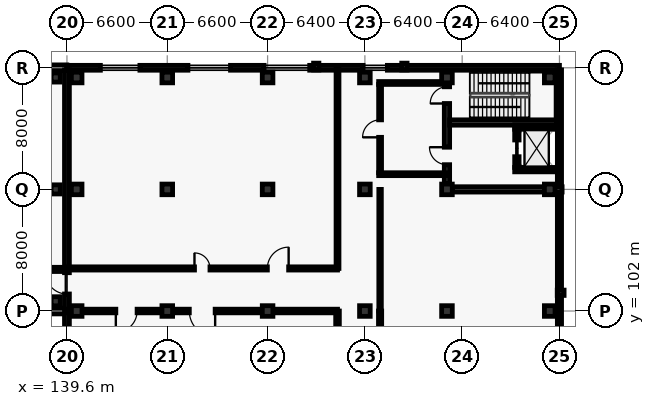
"""IFC4 building model, lengths in metres.
Left out: names, types, materials, properties, quantities, classifications, styles, units other than length and angle.
Written with IfcOpenShell. Run it as: python <this file> out.ifc"""

import sys

from ifc_helpers import new_model, si_unit, direction, frame, frame_2d, origin, origin_2d, place, context, subcontext, project, spatial, rectangle, extrude, element, fill, save


model = new_model("IFC4")
c1 = context("Model", 3, precision=1e-05, world=origin(), true_north=direction((0.0, 1.0)))
c2 = subcontext(c1, "Body", "Model", "MODEL_VIEW")
j1 = project(units=[si_unit("LENGTHUNIT", "METRE"), si_unit("PLANEANGLEUNIT", "RADIAN")], contexts=[c1])
p1 = place(None, origin())
s1 = spatial("IfcSite", under=j1, at=p1, CompositionType="ELEMENT")
p2 = place(p1, origin())
s2 = spatial("IfcBuilding", under=s1, at=p2, CompositionType="ELEMENT")
p3 = place(p2, frame((0.0, 0.0, 15.6)))
s3 = spatial("IfcBuildingStorey", under=s2, at=p3, CompositionType="ELEMENT", Elevation=15.6)
for number, where, z_axis, x_axis in (
    (1, (138.86, 102.64, 0.0), (0.0, 0.0, 1.0), (1.0, 0.0, 0.0)),
    (2, (138.86, 110.0, 0.0), (0.0, 0.0, 1.0), (1.0, 0.0, 0.0)),
    (3, (138.86, 117.36, 0.0), (0.0, 0.0, 1.0), (1.0, 0.0, 0.0)),
):
    element("IfcColumn", number, at=place(p3, frame(where, z_axis=z_axis, x_axis=x_axis)), inside=s3, PredefinedType="COLUMN", context=c2, shape_type="SweptSolid", body=[
        extrude(rectangle(XDim=0.6, YDim=0.6, at=origin_2d()), origin(), (0.0, 0.0, 1.0), 4.8),
    ])
for number, where, z_axis, x_axis in (
    (4, (140.24, 102.0, 0.0), (0.0, 0.0, 1.0), (1.0, 0.0, 0.0)),
    (5, (140.24, 110.0, 0.0), (0.0, 0.0, 1.0), (1.0, 0.0, 0.0)),
    (6, (140.24, 117.36, 0.0), (0.0, 0.0, 1.0), (1.0, 0.0, 0.0)),
    (7, (146.2, 102.0, 0.0), (0.0, 0.0, 1.0), (1.0, 0.0, 0.0)),
    (8, (146.2, 110.0, 0.0), (0.0, 0.0, 1.0), (1.0, 0.0, 0.0)),
    (9, (146.2, 117.36, 0.0), (0.0, 0.0, 1.0), (1.0, 0.0, 0.0)),
    (10, (152.8, 102.0, 0.0), (0.0, 0.0, 1.0), (1.0, 0.0, 0.0)),
    (11, (152.8, 110.0, 0.0), (0.0, 0.0, 1.0), (1.0, 0.0, 0.0)),
    (12, (152.8, 117.36, 0.0), (0.0, 0.0, 1.0), (1.0, 0.0, 0.0)),
    (13, (159.2, 102.0, 0.0), (0.0, 0.0, 1.0), (1.0, 0.0, 0.0)),
    (14, (159.2, 110.0, 0.0), (0.0, 0.0, 1.0), (1.0, 0.0, 0.0)),
    (15, (159.2, 117.36, 0.0), (0.0, 0.0, 1.0), (1.0, 0.0, 0.0)),
    (16, (164.6, 102.0, 0.0), (0.0, 0.0, 1.0), (1.0, 0.0, 0.0)),
    (17, (164.6, 110.0, 0.0), (0.0, 0.0, 1.0), (1.0, 0.0, 0.0)),
    (18, (164.6, 117.36, 0.0), (0.0, 0.0, 1.0), (1.0, 0.0, 0.0)),
    (19, (171.36, 102.0, 0.0), (0.0, 0.0, 1.0), (1.0, 0.0, 0.0)),
    (20, (171.36, 110.0, 0.0), (0.0, 0.0, 1.0), (1.0, 0.0, 0.0)),
    (21, (171.36, 117.36, 0.0), (0.0, 0.0, 1.0), (1.0, 0.0, 0.0)),
):
    element("IfcColumn", number, at=place(p3, frame(where, z_axis=z_axis, x_axis=x_axis)), inside=s3, PredefinedType="COLUMN", context=c2, shape_type="SweptSolid", body=[
        extrude(rectangle(XDim=0.7, YDim=0.7, at=origin_2d()), origin(), (0.0, 0.0, 1.0), 4.8),
    ])
for number, where, z_axis, x_axis in (
    (22, (172.08, 103.2, 0.0), (0.0, 0.0, 1.0), (1.0, 0.0, 0.0)),
    (23, (156.0, 118.08, 0.0), (0.0, 0.0, 1.0), (0.0, 1.0, 0.0)),
    (24, (161.8, 118.08, 0.0), (0.0, 0.0, 1.0), (0.0, 1.0, 0.0)),
):
    element("IfcColumn", number, at=place(p3, frame(where, z_axis=z_axis, x_axis=x_axis)), inside=s3, PredefinedType="PILASTER", context=c2, shape_type="SweptSolid", body=[
        extrude(rectangle(XDim=0.35, YDim=0.45, at=origin_2d()), origin(), (0.0, 0.0, 1.0), 4.8),
    ])
p4 = place(p3, frame((110.8, 118.0, 0.0), z_axis=(0.0, 0.0, 1.0), x_axis=(1.0, 0.0, 0.0)))
e25 = element("IfcWall", 25, at=p4, inside=s3, PredefinedType="SOLIDWALL", context=c2, shape_type="SweptSolid", body=[
    extrude(rectangle(XDim=28.795, YDim=0.38, at=frame_2d((14.397, 0.0))), origin(), (0.0, 0.0, 1.0), 4.555),
])
p5 = place(p4, frame((0.75, 0.0, 0.9)))
e26 = element("IfcOpeningElement", 26, at=p5, cuts=e25, PredefinedType="OPENING", context=c2, shape_type="SweptSolid", body=[
    extrude(rectangle(XDim=2.4, YDim=1.75, at=frame_2d((1.2, 0.875))), frame((0.0, 0.2, 0.0), z_axis=(0.0, -1.0, 0.0), x_axis=(1.0, 0.0, 0.0)), (0.0, 0.0, 1.0), 0.4),
])
p6 = place(p4, frame((8.475, 0.0, 0.9)))
e27 = element("IfcOpeningElement", 27, at=p6, cuts=e25, PredefinedType="OPENING", context=c2, shape_type="SweptSolid", body=[
    extrude(rectangle(XDim=2.6, YDim=1.75, at=frame_2d((1.3, 0.875))), frame((0.0, 0.2, 0.0), z_axis=(0.0, -1.0, 0.0), x_axis=(1.0, 0.0, 0.0)), (0.0, 0.0, 1.0), 0.4),
])
p7 = place(p4, frame((14.75, 0.0, 0.9)))
e28 = element("IfcOpeningElement", 28, at=p7, cuts=e25, PredefinedType="OPENING", context=c2, shape_type="SweptSolid", body=[
    extrude(rectangle(XDim=2.8, YDim=1.8, at=frame_2d((1.4, 0.9))), frame((0.0, 0.2, 0.0), z_axis=(0.0, -1.0, 0.0), x_axis=(1.0, 0.0, 0.0)), (0.0, 0.0, 1.0), 0.4),
])
p8 = place(p4, frame((21.025, 0.0, 0.9)))
e29 = element("IfcOpeningElement", 29, at=p8, cuts=e25, PredefinedType="OPENING", context=c2, shape_type="SweptSolid", body=[
    extrude(rectangle(XDim=3.0, YDim=1.8, at=frame_2d((1.5, 0.9))), frame((0.0, 0.2, 0.0), z_axis=(0.0, -1.0, 0.0), x_axis=(1.0, 0.0, 0.0)), (0.0, 0.0, 1.0), 0.4),
])
p9 = place(p3, frame((139.5, 102.0, 0.0), z_axis=(0.0, 0.0, 1.0), x_axis=(-1.0, 0.0, 0.0)))
e30 = element("IfcWall", 30, at=p9, inside=s3, PredefinedType="SOLIDWALL", context=c2, shape_type="SweptSolid", body=[
    extrude(rectangle(XDim=28.7, YDim=0.38, at=frame_2d((14.35, 0.0))), origin(), (0.0, 0.0, 1.0), 4.555),
])
p10 = place(p9, frame((2.2, 0.0, 0.9)))
e31 = element("IfcOpeningElement", 31, at=p10, cuts=e30, PredefinedType="OPENING", context=c2, shape_type="SweptSolid", body=[
    extrude(rectangle(XDim=3.2, YDim=1.85, at=frame_2d((1.6, 0.925))), frame((0.0, 0.2, 0.0), z_axis=(0.0, -1.0, 0.0), x_axis=(1.0, 0.0, 0.0)), (0.0, 0.0, 1.0), 0.4),
])
p11 = place(p9, frame((8.475, 0.0, 0.9)))
e32 = element("IfcOpeningElement", 32, at=p11, cuts=e30, PredefinedType="OPENING", context=c2, shape_type="SweptSolid", body=[
    extrude(rectangle(XDim=3.4, YDim=1.85, at=frame_2d((1.7, 0.925))), frame((0.0, 0.2, 0.0), z_axis=(0.0, -1.0, 0.0), x_axis=(1.0, 0.0, 0.0)), (0.0, 0.0, 1.0), 0.4),
])
p12 = place(p9, frame((14.75, 0.0, 0.9)))
e33 = element("IfcOpeningElement", 33, at=p12, cuts=e30, PredefinedType="OPENING", context=c2, shape_type="SweptSolid", body=[
    extrude(rectangle(XDim=3.6, YDim=1.9, at=frame_2d((1.8, 0.95))), frame((0.0, 0.2, 0.0), z_axis=(0.0, -1.0, 0.0), x_axis=(1.0, 0.0, 0.0)), (0.0, 0.0, 1.0), 0.4),
])
p13 = place(p9, frame((21.025, 0.0, 0.9)))
e34 = element("IfcOpeningElement", 34, at=p13, cuts=e30, PredefinedType="OPENING", context=c2, shape_type="SweptSolid", body=[
    extrude(rectangle(XDim=3.8, YDim=1.9, at=frame_2d((1.9, 0.95))), frame((0.0, 0.2, 0.0), z_axis=(0.0, -1.0, 0.0), x_axis=(1.0, 0.0, 0.0)), (0.0, 0.0, 1.0), 0.4),
])
p14 = place(p3, frame((139.6, 118.0, 0.0), z_axis=(0.0, 0.0, 1.0), x_axis=(1.0, 0.0, 0.0)))
e35 = element("IfcWall", 35, at=p14, inside=s3, PredefinedType="SOLIDWALL", context=c2, shape_type="SweptSolid", body=[
    extrude(rectangle(XDim=32.4, YDim=0.32, at=frame_2d((16.2, 0.0))), origin(), (0.0, 0.0, 1.0), 4.58),
])
p15 = place(p14, frame((2.2, 0.0, 0.9)))
e36 = element("IfcOpeningElement", 36, at=p15, cuts=e35, PredefinedType="OPENING", context=c2, shape_type="SweptSolid", body=[
    extrude(rectangle(XDim=2.6, YDim=1.75, at=frame_2d((1.3, 0.875))), frame((0.0, 0.17, 0.0), z_axis=(0.0, -1.0, 0.0), x_axis=(1.0, 0.0, 0.0)), (0.0, 0.0, 1.0), 0.34),
])
p16 = place(p14, frame((7.96, 0.0, 0.9)))
e37 = element("IfcOpeningElement", 37, at=p16, cuts=e35, PredefinedType="OPENING", context=c2, shape_type="SweptSolid", body=[
    extrude(rectangle(XDim=2.8, YDim=1.8, at=frame_2d((1.4, 0.9))), frame((0.0, 0.17, 0.0), z_axis=(0.0, -1.0, 0.0), x_axis=(1.0, 0.0, 0.0)), (0.0, 0.0, 1.0), 0.34),
])
p17 = place(p14, frame((12.97, 0.0, 0.9)))
e38 = element("IfcOpeningElement", 38, at=p17, cuts=e35, PredefinedType="OPENING", context=c2, shape_type="SweptSolid", body=[
    extrude(rectangle(XDim=3.0, YDim=1.8, at=frame_2d((1.5, 0.9))), frame((0.0, 0.17, 0.0), z_axis=(0.0, -1.0, 0.0), x_axis=(1.0, 0.0, 0.0)), (0.0, 0.0, 1.0), 0.34),
])
p18 = place(p14, frame((19.48, 0.0, 0.9)))
e39 = element("IfcOpeningElement", 39, at=p18, cuts=e35, PredefinedType="OPENING", context=c2, shape_type="SweptSolid", body=[
    extrude(rectangle(XDim=1.6, YDim=1.65, at=frame_2d((0.8, 0.825))), frame((0.0, 0.17, 0.0), z_axis=(0.0, -1.0, 0.0), x_axis=(1.0, 0.0, 0.0)), (0.0, 0.0, 1.0), 0.34),
])
p19 = place(p3, frame((172.0, 117.86, 0.0), z_axis=(0.0, 0.0, 1.0), x_axis=(0.0, -1.0, 0.0)))
e40 = element("IfcWall", 40, at=p19, inside=s3, PredefinedType="SOLIDWALL", context=c2, shape_type="SweptSolid", body=[
    extrude(rectangle(XDim=46.12, YDim=0.275, at=frame_2d((23.06, 0.0))), origin(), (0.0, 0.0, 1.0), 4.58),
])
p20 = place(p3, frame((139.6, 71.74, 0.0), z_axis=(0.0, 0.0, 1.0), x_axis=(0.0, 1.0, 0.0)))
e41 = element("IfcWall", 41, at=p20, inside=s3, PredefinedType="SOLIDWALL", context=c2, shape_type="SweptSolid", body=[
    extrude(rectangle(XDim=46.12, YDim=0.32, at=frame_2d((23.06, 0.0))), origin(), (0.0, 0.0, 1.0), 4.58),
])
p21 = place(p20, frame((31.38, 0.0, 0.0)))
e42 = element("IfcOpeningElement", 42, at=p21, cuts=e41, PredefinedType="OPENING", context=c2, shape_type="SweptSolid", body=[
    extrude(rectangle(XDim=1.4, YDim=2.25, at=frame_2d((0.7, 1.125))), frame((0.0, 0.17, 0.0), z_axis=(0.0, -1.0, 0.0), x_axis=(1.0, 0.0, 0.0)), (0.0, 0.0, 1.0), 0.34),
])
p22 = place(p3, frame((164.952, 110.0, 0.0), z_axis=(0.0, 0.0, 1.0), x_axis=(1.0, 0.0, 0.0)))
e43 = element("IfcWall", 43, at=p22, inside=s3, PredefinedType="SHEAR", context=c2, shape_type="SweptSolid", body=[
    extrude(rectangle(XDim=7.223, YDim=0.35, at=frame_2d((3.612, 0.0))), origin(), (0.0, 0.0, 1.0), 4.58),
])
p23 = place(p3, frame((164.6, 110.352, 0.0), z_axis=(0.0, 0.0, 1.0), x_axis=(0.0, 1.0, 0.0)))
e44 = element("IfcWall", 44, at=p23, inside=s3, PredefinedType="SHEAR", context=c2, shape_type="SweptSolid", body=[
    extrude(rectangle(XDim=7.473, YDim=0.35, at=frame_2d((3.736, 0.0))), origin(), (0.0, 0.0, 1.0), 4.58),
])
p24 = place(p23, frame((5.298, 0.0, 0.0)))
e45 = element("IfcOpeningElement", 45, at=p24, cuts=e44, PredefinedType="OPENING", context=c2, shape_type="SweptSolid", body=[
    extrude(rectangle(XDim=1.1, YDim=2.15, at=frame_2d((0.55, 1.075))), frame((0.0, 0.185, 0.0), z_axis=(0.0, -1.0, 0.0), x_axis=(1.0, 0.0, 0.0)), (0.0, 0.0, 1.0), 0.37),
])
p25 = place(p23, frame((1.273, 0.0, 0.0)))
e46 = element("IfcOpeningElement", 46, at=p25, cuts=e44, PredefinedType="OPENING", context=c2, shape_type="SweptSolid", body=[
    extrude(rectangle(XDim=1.15, YDim=2.2, at=frame_2d((0.575, 1.1))), frame((0.0, 0.185, 0.0), z_axis=(0.0, -1.0, 0.0), x_axis=(1.0, 0.0, 0.0)), (0.0, 0.0, 1.0), 0.37),
])
p26 = place(p3, frame((164.775, 114.4, 0.0), z_axis=(0.0, 0.0, 1.0), x_axis=(1.0, 0.0, 0.0)))
e47 = element("IfcWall", 47, at=p26, inside=s3, PredefinedType="SHEAR", context=c2, shape_type="SweptSolid", body=[
    extrude(rectangle(XDim=7.05, YDim=0.35, at=frame_2d((3.525, 0.0))), origin(), (0.0, 0.0, 1.0), 4.58),
])
for number, where, z_axis, x_axis in (
    (48, (169.055, 111.3, 0.0), (0.0, 0.0, 1.0), (1.0, 0.0, 0.0)),
    (49, (169.055, 114.1, 0.0), (0.0, 0.0, 1.0), (1.0, 0.0, 0.0)),
):
    element("IfcWall", number, at=place(p3, frame(where, z_axis=z_axis, x_axis=x_axis)), inside=s3, PredefinedType="SHEAR", context=c2, shape_type="SweptSolid", body=[
        extrude(rectangle(XDim=2.89, YDim=0.29, at=frame_2d((1.445, 0.0))), origin(), (0.0, 0.0, 1.0), 4.58),
    ])
p27 = place(p3, frame((169.2, 111.445, 0.0), z_axis=(0.0, 0.0, 1.0), x_axis=(0.0, 1.0, 0.0)))
e50 = element("IfcWall", 50, at=p27, inside=s3, PredefinedType="SHEAR", context=c2, shape_type="SweptSolid", body=[
    extrude(rectangle(XDim=2.51, YDim=0.29, at=frame_2d((1.255, 0.0))), origin(), (0.0, 0.0, 1.0), 4.58),
])
p28 = place(p27, frame((0.705, 0.0, 0.0)))
e51 = element("IfcOpeningElement", 51, at=p28, cuts=e50, PredefinedType="OPENING", context=c2, shape_type="SweptSolid", body=[
    extrude(rectangle(XDim=1.1, YDim=2.15, at=frame_2d((0.55, 1.075))), frame((0.0, 0.155, 0.0), z_axis=(0.0, -1.0, 0.0), x_axis=(1.0, 0.0, 0.0)), (0.0, 0.0, 1.0), 0.31),
])
p29 = place(p3, frame((160.105, 111.0, 0.0), z_axis=(0.0, 0.0, 1.0), x_axis=(1.0, 0.0, 0.0)))
e52 = element("IfcWall", 52, at=p29, inside=s3, PredefinedType="PARTITIONING", context=c2, shape_type="SweptSolid", body=[
    extrude(rectangle(XDim=4.495, YDim=0.19, at=frame_2d((2.248, 0.0))), origin(), (0.0, 0.0, 1.0), 4.58),
])
p30 = place(p3, frame((160.105, 117.0, 0.0), z_axis=(0.0, 0.0, 1.0), x_axis=(1.0, 0.0, 0.0)))
e53 = element("IfcWall", 53, at=p30, inside=s3, PredefinedType="PARTITIONING", context=c2, shape_type="SweptSolid", body=[
    extrude(rectangle(XDim=4.143, YDim=0.19, at=frame_2d((2.072, 0.0))), origin(), (0.0, 0.0, 1.0), 3.93),
])
p31 = place(p3, frame((160.2, 111.095, 0.0), z_axis=(0.0, 0.0, 1.0), x_axis=(0.0, 1.0, 0.0)))
e54 = element("IfcWall", 54, at=p31, inside=s3, PredefinedType="PARTITIONING", context=c2, shape_type="SweptSolid", body=[
    extrude(rectangle(XDim=5.81, YDim=0.19, at=frame_2d((2.905, 0.0))), origin(), (0.0, 0.0, 1.0), 4.58),
])
p32 = place(p31, frame((2.33, 0.0, 0.0)))
e55 = element("IfcOpeningElement", 55, at=p32, cuts=e54, PredefinedType="OPENING", context=c2, shape_type="SweptSolid", body=[
    extrude(rectangle(XDim=1.15, YDim=2.2, at=frame_2d((0.575, 1.1))), frame((0.0, 0.105, 0.0), z_axis=(0.0, -1.0, 0.0), x_axis=(1.0, 0.0, 0.0)), (0.0, 0.0, 1.0), 0.21),
])
p33 = place(p3, frame((125.0, 104.8, 0.0), z_axis=(0.0, 0.0, 1.0), x_axis=(1.0, 0.0, 0.0)))
e56 = element("IfcWall", 56, at=p33, inside=s3, PredefinedType="PARTITIONING", context=c2, shape_type="SweptSolid", body=[
    extrude(rectangle(XDim=14.5, YDim=0.15, at=frame_2d((7.25, 0.0))), origin(), (0.0, 0.0, 1.0), 4.555),
])
p34 = place(p33, frame((6.775, 0.0, 0.0)))
e57 = element("IfcOpeningElement", 57, at=p34, cuts=e56, PredefinedType="OPENING", context=c2, shape_type="SweptSolid", body=[
    extrude(rectangle(XDim=0.95, YDim=2.1, at=frame_2d((0.475, 1.05))), frame((0.0, 0.085, 0.0), z_axis=(0.0, -1.0, 0.0), x_axis=(1.0, 0.0, 0.0)), (0.0, 0.0, 1.0), 0.17),
])
p35 = place(p3, frame((157.4, 102.0, 0.0), z_axis=(0.0, 0.0, 1.0), x_axis=(-1.0, 0.0, 0.0)))
e58 = element("IfcWall", 58, at=p35, inside=s3, PredefinedType="PARTITIONING", context=c2, shape_type="SweptSolid", body=[
    extrude(rectangle(XDim=17.8, YDim=0.24, at=frame_2d((8.9, 0.0))), origin(), (0.0, 0.0, 1.0), 3.93),
])
p36 = place(p35, frame((8.05, 0.0, 0.0)))
e59 = element("IfcOpeningElement", 59, at=p36, cuts=e58, PredefinedType="OPENING", context=c2, shape_type="SweptSolid", body=[
    extrude(rectangle(XDim=1.7, YDim=2.3, at=frame_2d((0.85, 1.15))), frame((0.0, 0.13, 0.0), z_axis=(0.0, -1.0, 0.0), x_axis=(1.0, 0.0, 0.0)), (0.0, 0.0, 1.0), 0.26),
])
p37 = place(p35, frame((13.184, 0.0, 0.0)))
e60 = element("IfcOpeningElement", 60, at=p37, cuts=e58, PredefinedType="OPENING", context=c2, shape_type="SweptSolid", body=[
    extrude(rectangle(XDim=1.4, YDim=2.25, at=frame_2d((0.7, 1.125))), frame((0.0, 0.13, 0.0), z_axis=(0.0, -1.0, 0.0), x_axis=(1.0, 0.0, 0.0)), (0.0, 0.0, 1.0), 0.26),
])
p38 = place(p3, frame((139.6, 104.8, 0.0), z_axis=(0.0, 0.0, 1.0), x_axis=(1.0, 0.0, 0.0)))
e61 = element("IfcWall", 61, at=p38, inside=s3, PredefinedType="PARTITIONING", context=c2, shape_type="SweptSolid", body=[
    extrude(rectangle(XDim=17.8, YDim=0.21, at=frame_2d((8.9, 0.0))), origin(), (0.0, 0.0, 1.0), 4.58),
])
p39 = place(p38, frame((8.39, 0.0, 0.0)))
e62 = element("IfcOpeningElement", 62, at=p39, cuts=e61, PredefinedType="OPENING", context=c2, shape_type="SweptSolid", body=[
    extrude(rectangle(XDim=1.02, YDim=2.1, at=frame_2d((0.51, 1.05))), frame((0.0, 0.115, 0.0), z_axis=(0.0, -1.0, 0.0), x_axis=(1.0, 0.0, 0.0)), (0.0, 0.0, 1.0), 0.23),
])
p40 = place(p38, frame((13.184, 0.0, 0.0)))
e63 = element("IfcOpeningElement", 63, at=p40, cuts=e61, PredefinedType="OPENING", context=c2, shape_type="SweptSolid", body=[
    extrude(rectangle(XDim=1.4, YDim=2.25, at=frame_2d((0.7, 1.125))), frame((0.0, 0.115, 0.0), z_axis=(0.0, -1.0, 0.0), x_axis=(1.0, 0.0, 0.0)), (0.0, 0.0, 1.0), 0.23),
])
p41 = place(p3, frame((157.4, 104.8, 0.0), z_axis=(0.0, 0.0, 1.0), x_axis=(0.0, 1.0, 0.0)))
e64 = element("IfcWall", 64, at=p41, inside=s3, PredefinedType="PARTITIONING", context=c2, shape_type="SweptSolid", body=[
    extrude(rectangle(XDim=13.2, YDim=0.19, at=frame_2d((6.6, 0.0))), origin(), (0.0, 0.0, 1.0), 4.58),
])
p42 = place(p3, frame((160.2, 110.0, 0.0), z_axis=(0.0, 0.0, 1.0), x_axis=(0.0, -1.0, 0.0)))
e65 = element("IfcWall", 65, at=p42, inside=s3, PredefinedType="PARTITIONING", context=c2, shape_type="SweptSolid", body=[
    extrude(rectangle(XDim=8.0, YDim=0.165, at=frame_2d((4.0, 0.0))), origin(), (0.0, 0.0, 1.0), 4.58),
])
p43 = place(p3, frame((157.4, 88.0, 0.0), z_axis=(0.0, 0.0, 1.0), x_axis=(0.0, 1.0, 0.0)))
e66 = element("IfcWall", 66, at=p43, inside=s3, PredefinedType="PARTITIONING", context=c2, shape_type="SweptSolid", body=[
    extrude(rectangle(XDim=14.0, YDim=0.24, at=frame_2d((7.0, 0.0))), origin(), (0.0, 0.0, 1.0), 4.58),
])
p44 = place(p3, frame((160.2, 102.0, 0.0), z_axis=(0.0, 0.0, 1.0), x_axis=(0.0, -1.0, 0.0)))
e67 = element("IfcWall", 67, at=p44, inside=s3, PredefinedType="PARTITIONING", context=c2, shape_type="SweptSolid", body=[
    extrude(rectangle(XDim=22.4, YDim=0.21, at=frame_2d((11.2, 0.0))), origin(), (0.0, 0.0, 1.0), 4.58),
])
p45 = place(p44, frame((10.325, 0.0, 0.0)))
e68 = element("IfcOpeningElement", 68, at=p45, cuts=e67, PredefinedType="OPENING", context=c2, shape_type="SweptSolid", body=[
    extrude(rectangle(XDim=1.75, YDim=2.35, at=frame_2d((0.875, 1.175))), frame((0.0, 0.115, 0.0), z_axis=(0.0, -1.0, 0.0), x_axis=(1.0, 0.0, 0.0)), (0.0, 0.0, 1.0), 0.23),
])
p46 = place(p44, frame((16.772, 0.0, 0.0)))
e69 = element("IfcOpeningElement", 69, at=p46, cuts=e67, PredefinedType="OPENING", context=c2, shape_type="SweptSolid", body=[
    extrude(rectangle(XDim=1.4, YDim=2.25, at=frame_2d((0.7, 1.125))), frame((0.0, 0.115, 0.0), z_axis=(0.0, -1.0, 0.0), x_axis=(1.0, 0.0, 0.0)), (0.0, 0.0, 1.0), 0.23),
])
p47 = place(p15, origin())
e70 = element("IfcWindow", 70, at=p47, inside=s3, PartitioningType="SINGLE_PANEL", PredefinedType="WINDOW", context=c2, shape_type="SweptSolid", body=[
    extrude(rectangle(XDim=2.6, YDim=1.75, at=frame_2d((1.3, 0.875))), frame((0.0, 0.03, 0.0), z_axis=(0.0, -1.0, 0.0), x_axis=(1.0, 0.0, 0.0)), (0.0, 0.0, 1.0), 0.06),
])
fill(e36, e70)
p48 = place(p16, origin())
e71 = element("IfcWindow", 71, at=p48, inside=s3, PartitioningType="SINGLE_PANEL", PredefinedType="WINDOW", context=c2, shape_type="SweptSolid", body=[
    extrude(rectangle(XDim=2.8, YDim=1.8, at=frame_2d((1.4, 0.9))), frame((0.0, 0.03, 0.0), z_axis=(0.0, -1.0, 0.0), x_axis=(1.0, 0.0, 0.0)), (0.0, 0.0, 1.0), 0.06),
])
fill(e37, e71)
p49 = place(p17, origin())
e72 = element("IfcWindow", 72, at=p49, inside=s3, PartitioningType="SINGLE_PANEL", PredefinedType="WINDOW", context=c2, shape_type="SweptSolid", body=[
    extrude(rectangle(XDim=3.0, YDim=1.8, at=frame_2d((1.5, 0.9))), frame((0.0, 0.03, 0.0), z_axis=(0.0, -1.0, 0.0), x_axis=(1.0, 0.0, 0.0)), (0.0, 0.0, 1.0), 0.06),
])
fill(e38, e72)
p50 = place(p18, origin())
e73 = element("IfcWindow", 73, at=p50, inside=s3, PartitioningType="SINGLE_PANEL", PredefinedType="WINDOW", context=c2, shape_type="SweptSolid", body=[
    extrude(rectangle(XDim=1.6, YDim=1.65, at=frame_2d((0.8, 0.825))), frame((0.0, 0.03, 0.0), z_axis=(0.0, -1.0, 0.0), x_axis=(1.0, 0.0, 0.0)), (0.0, 0.0, 1.0), 0.06),
])
fill(e39, e73)
p51 = place(p24, origin())
e74 = element("IfcDoor", 74, at=p51, inside=s3, OperationType="SINGLE_SWING_LEFT", PredefinedType="DOOR", context=c2, shape_type="SweptSolid", body=[
    extrude(rectangle(XDim=1.1, YDim=2.15, at=frame_2d((0.55, 1.075))), frame((0.0, 0.025, 0.0), z_axis=(0.0, -1.0, 0.0), x_axis=(1.0, 0.0, 0.0)), (0.0, 0.0, 1.0), 0.05),
])
fill(e45, e74)
p52 = place(p25, origin())
e75 = element("IfcDoor", 75, at=p52, inside=s3, OperationType="SINGLE_SWING_RIGHT", PredefinedType="DOOR", context=c2, shape_type="SweptSolid", body=[
    extrude(rectangle(XDim=1.15, YDim=2.2, at=frame_2d((0.575, 1.1))), frame((0.0, 0.025, 0.0), z_axis=(0.0, -1.0, 0.0), x_axis=(1.0, 0.0, 0.0)), (0.0, 0.0, 1.0), 0.05),
])
fill(e46, e75)
p53 = place(p28, origin())
e76 = element("IfcDoor", 76, at=p53, inside=s3, OperationType="SLIDING_TO_LEFT", PredefinedType="DOOR", context=c2, shape_type="SweptSolid", body=[
    extrude(rectangle(XDim=1.1, YDim=2.15, at=frame_2d((0.55, 1.075))), frame((0.0, 0.025, 0.0), z_axis=(0.0, -1.0, 0.0), x_axis=(1.0, 0.0, 0.0)), (0.0, 0.0, 1.0), 0.05),
])
fill(e51, e76)
p54 = place(p32, origin())
e77 = element("IfcDoor", 77, at=p54, inside=s3, OperationType="SINGLE_SWING_LEFT", PredefinedType="DOOR", context=c2, shape_type="SweptSolid", body=[
    extrude(rectangle(XDim=1.15, YDim=2.2, at=frame_2d((0.575, 1.1))), frame((0.0, 0.025, 0.0), z_axis=(0.0, -1.0, 0.0), x_axis=(1.0, 0.0, 0.0)), (0.0, 0.0, 1.0), 0.05),
])
fill(e55, e77)
p55 = place(p21, origin())
e78 = element("IfcDoor", 78, at=p55, inside=s3, OperationType="SINGLE_SWING_RIGHT", PredefinedType="DOOR", context=c2, shape_type="SweptSolid", body=[
    extrude(rectangle(XDim=1.4, YDim=2.25, at=frame_2d((0.7, 1.125))), frame((0.0, 0.025, 0.0), z_axis=(0.0, -1.0, 0.0), x_axis=(1.0, 0.0, 0.0)), (0.0, 0.0, 1.0), 0.05),
])
fill(e42, e78)
p56 = place(p36, origin())
e79 = element("IfcDoor", 79, at=p56, inside=s3, OperationType="SINGLE_SWING_LEFT", PredefinedType="DOOR", context=c2, shape_type="SweptSolid", body=[
    extrude(rectangle(XDim=1.7, YDim=2.3, at=frame_2d((0.85, 1.15))), frame((0.0, 0.025, 0.0), z_axis=(0.0, -1.0, 0.0), x_axis=(1.0, 0.0, 0.0)), (0.0, 0.0, 1.0), 0.05),
])
fill(e59, e79)
p57 = place(p37, origin())
e80 = element("IfcDoor", 80, at=p57, inside=s3, OperationType="SINGLE_SWING_RIGHT", PredefinedType="DOOR", context=c2, shape_type="SweptSolid", body=[
    extrude(rectangle(XDim=1.4, YDim=2.25, at=frame_2d((0.7, 1.125))), frame((0.0, 0.025, 0.0), z_axis=(0.0, -1.0, 0.0), x_axis=(1.0, 0.0, 0.0)), (0.0, 0.0, 1.0), 0.05),
])
fill(e60, e80)
p58 = place(p39, origin())
e81 = element("IfcDoor", 81, at=p58, inside=s3, OperationType="SINGLE_SWING_LEFT", PredefinedType="DOOR", context=c2, shape_type="SweptSolid", body=[
    extrude(rectangle(XDim=1.02, YDim=2.1, at=frame_2d((0.51, 1.05))), frame((0.0, 0.025, 0.0), z_axis=(0.0, -1.0, 0.0), x_axis=(1.0, 0.0, 0.0)), (0.0, 0.0, 1.0), 0.05),
])
fill(e62, e81)
p59 = place(p40, origin())
e82 = element("IfcDoor", 82, at=p59, inside=s3, OperationType="SINGLE_SWING_RIGHT", PredefinedType="DOOR", context=c2, shape_type="SweptSolid", body=[
    extrude(rectangle(XDim=1.4, YDim=2.25, at=frame_2d((0.7, 1.125))), frame((0.0, 0.025, 0.0), z_axis=(0.0, -1.0, 0.0), x_axis=(1.0, 0.0, 0.0)), (0.0, 0.0, 1.0), 0.05),
])
fill(e63, e82)
save(model, sys.argv[1])
